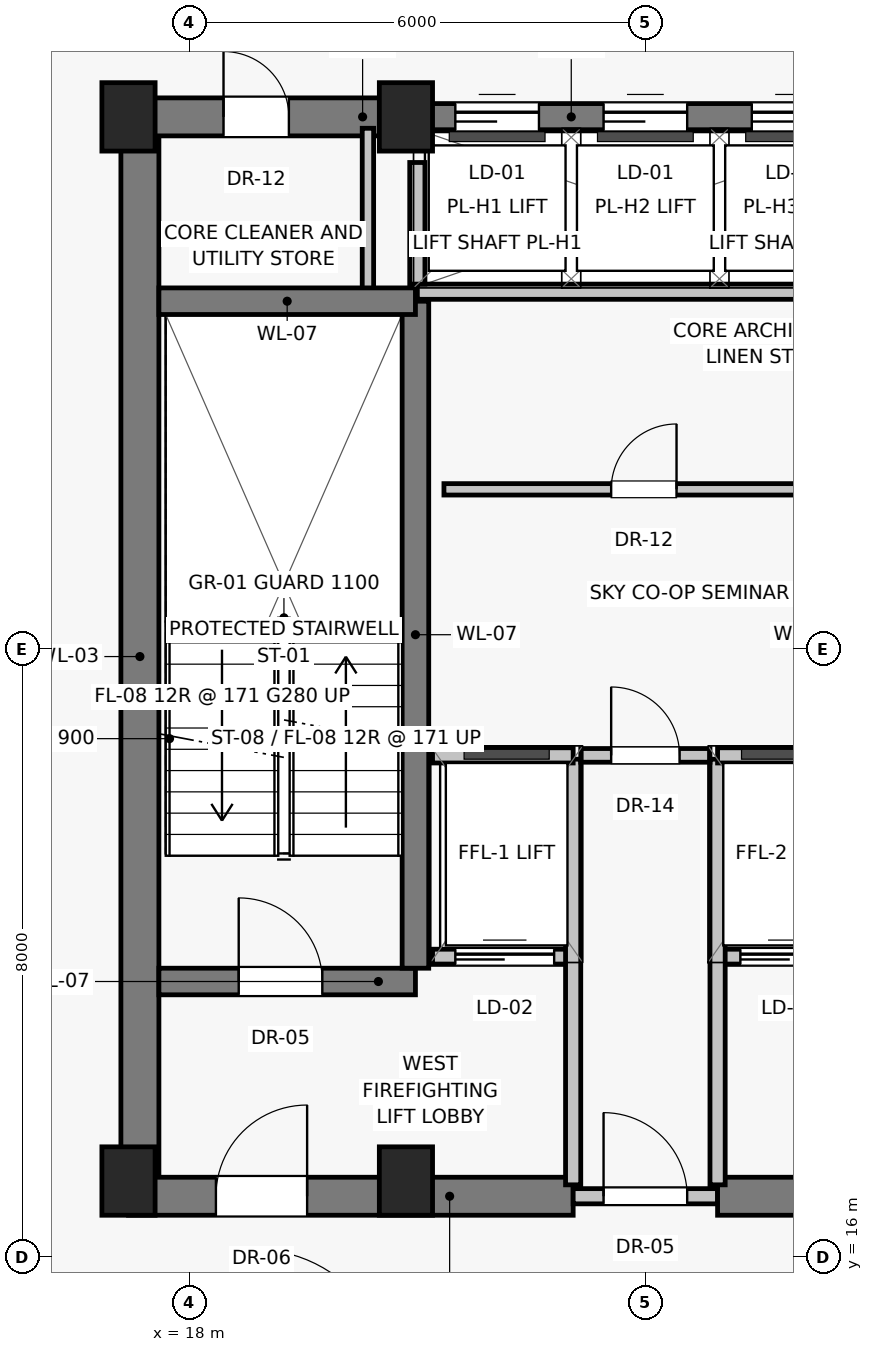
"""IFC4 building model, lengths in metres.
Left out: names, types, materials, properties, quantities, classifications, styles, units other than length and angle.
Written with IfcOpenShell. Run it as: python <this file> out.ifc"""

import sys

from ifc_helpers import new_model, si_unit, direction, frame, frame_2d, origin, origin_2d, place, context, subcontext, project, spatial, rectangle, extrude, source, transform, mapped, element, fill, save


model = new_model("IFC4")
c1 = context("Model", 3, precision=1e-05, world=origin(), true_north=direction((0.0, 1.0)))
c2 = subcontext(c1, "Body", "Model", "MODEL_VIEW")
j1 = project(units=[si_unit("LENGTHUNIT", "METRE"), si_unit("PLANEANGLEUNIT", "RADIAN")], contexts=[c1])
p1 = place(None, origin())
s1 = spatial("IfcSite", under=j1, at=p1, CompositionType="ELEMENT")
p2 = place(p1, origin())
s2 = spatial("IfcBuilding", under=s1, at=p2, CompositionType="ELEMENT")
p3 = place(p2, frame((0.0, 0.0, 236.55)))
s3 = spatial("IfcBuildingStorey", under=s2, at=p3, CompositionType="ELEMENT", Elevation=236.55)
for number, where, z_axis, x_axis in (
    (1, (17.2, 17.0, 0.0), (0.0, 0.0, 1.0), (1.0, 0.0, 0.0)),
    (2, (20.85, 17.0, 0.0), (0.0, 0.0, 1.0), (1.0, 0.0, 0.0)),
    (3, (17.2, 31.0, 0.0), (0.0, 0.0, 1.0), (1.0, 0.0, 0.0)),
    (4, (20.85, 31.0, 0.0), (0.0, 0.0, 1.0), (1.0, 0.0, 0.0)),
):
    element("IfcColumn", number, at=place(p3, frame(where, z_axis=z_axis, x_axis=x_axis)), inside=s3, PredefinedType="PILASTER", context=c2, shape_type="SweptSolid", body=[
        extrude(rectangle(XDim=0.7, YDim=0.9, at=origin_2d()), origin(), (0.0, 0.0, 1.0), 4.1),
    ])
p4 = place(p3, frame((17.35, 16.8, 0.0), z_axis=(0.0, 0.0, 1.0), x_axis=(0.0, 1.0, 0.0)))
e5 = element("IfcWall", 5, at=p4, inside=s3, PredefinedType="SHEAR", context=c2, shape_type="SweptSolid", body=[
    extrude(rectangle(XDim=14.2, YDim=0.5, at=frame_2d((7.1, 0.0))), origin(), (0.0, 0.0, 1.0), 3.865),
])
p5 = place(p3, frame((17.2, 16.8, 0.0), z_axis=(0.0, 0.0, 1.0), x_axis=(1.0, 0.0, 0.0)))
e6 = element("IfcWall", 6, at=p5, inside=s3, PredefinedType="SHEAR", context=c2, shape_type="SweptSolid", body=[
    extrude(rectangle(XDim=5.85, YDim=0.5, at=frame_2d((2.925, 0.0))), origin(), (0.0, 0.0, 1.0), 3.865),
])
p6 = place(p5, frame((1.15, 0.0, 0.0)))
e7 = element("IfcOpeningElement", 7, at=p6, cuts=e6, PredefinedType="OPENING", context=c2, shape_type="SweptSolid", body=[
    extrude(rectangle(XDim=1.2, YDim=2.03, at=frame_2d((0.6, 1.015))), frame((0.0, 0.26, 0.0), z_axis=(0.0, -1.0, 0.0), x_axis=(1.0, 0.0, 0.0)), (0.0, 0.0, 1.0), 0.52),
])
p7 = place(p3, frame((23.05, 16.8, 0.0), z_axis=(0.0, 0.0, 1.0), x_axis=(1.0, 0.0, 0.0)))
e8 = element("IfcWall", 8, at=p7, inside=s3, PredefinedType="SOLIDWALL", context=c2, shape_type="SweptSolid", body=[
    extrude(rectangle(XDim=1.9, YDim=0.2, at=frame_2d((0.95, 0.0))), origin(), (0.0, 0.0, 1.0), 3.015),
])
p8 = place(p7, frame((0.4, 0.0, 0.0)))
e9 = element("IfcOpeningElement", 9, at=p8, cuts=e8, PredefinedType="OPENING", context=c2, shape_type="SweptSolid", body=[
    extrude(rectangle(XDim=1.1, YDim=2.03, at=frame_2d((0.55, 1.015))), frame((0.0, 0.11, 0.0), z_axis=(0.0, -1.0, 0.0), x_axis=(1.0, 0.0, 0.0)), (0.0, 0.0, 1.0), 0.22),
])
p9 = place(p3, frame((24.95, 16.8, 0.0), z_axis=(0.0, 0.0, 1.0), x_axis=(1.0, 0.0, 0.0)))
e10 = element("IfcWall", 10, at=p9, inside=s3, PredefinedType="SHEAR", context=c2, shape_type="SweptSolid", body=[
    extrude(rectangle(XDim=5.85, YDim=0.5, at=frame_2d((2.925, 0.0))), origin(), (0.0, 0.0, 1.0), 3.865),
])
p10 = place(p9, frame((2.15, 0.0, 0.0)))
e11 = element("IfcOpeningElement", 11, at=p10, cuts=e10, PredefinedType="OPENING", context=c2, shape_type="SweptSolid", body=[
    extrude(rectangle(XDim=1.2, YDim=2.03, at=frame_2d((0.6, 1.015))), frame((0.0, 0.26, 0.0), z_axis=(0.0, -1.0, 0.0), x_axis=(1.0, 0.0, 0.0)), (0.0, 0.0, 1.0), 0.52),
])
p11 = place(p3, frame((17.2, 31.0, 0.0), z_axis=(0.0, 0.0, 1.0), x_axis=(1.0, 0.0, 0.0)))
e12 = element("IfcWall", 12, at=p11, inside=s3, PredefinedType="SHEAR", context=c2, shape_type="SweptSolid", body=[
    extrude(rectangle(XDim=3.8, YDim=0.5, at=frame_2d((1.9, 0.0))), origin(), (0.0, 0.0, 1.0), 3.865),
])
p12 = place(p11, frame((1.25, 0.0, 0.0)))
e13 = element("IfcOpeningElement", 13, at=p12, cuts=e12, PredefinedType="OPENING", context=c2, shape_type="SweptSolid", body=[
    extrude(rectangle(XDim=0.86, YDim=2.01, at=frame_2d((0.43, 1.005))), frame((0.0, 0.26, 0.0), z_axis=(0.0, -1.0, 0.0), x_axis=(1.0, 0.0, 0.0)), (0.0, 0.0, 1.0), 0.52),
])
p13 = place(p3, frame((21.0, 31.0, 0.0), z_axis=(0.0, 0.0, 1.0), x_axis=(1.0, 0.0, 0.0)))
e14 = element("IfcWall", 14, at=p13, inside=s3, PredefinedType="SHEAR", context=c2, shape_type="SweptSolid", body=[
    extrude(rectangle(XDim=6.0, YDim=0.35, at=frame_2d((3.0, 0.0))), origin(), (0.0, 0.0, 1.0), 3.865),
])
p14 = place(p13, frame((0.5, 0.0, 0.0)))
e15 = element("IfcOpeningElement", 15, at=p14, cuts=e14, PredefinedType="OPENING", context=c2, shape_type="SweptSolid", body=[
    extrude(rectangle(XDim=1.1, YDim=2.08, at=frame_2d((0.55, 1.04))), frame((0.0, 0.185, 0.0), z_axis=(0.0, -1.0, 0.0), x_axis=(1.0, 0.0, 0.0)), (0.0, 0.0, 1.0), 0.37),
])
p15 = place(p13, frame((2.45, 0.0, 0.0)))
e16 = element("IfcOpeningElement", 16, at=p15, cuts=e14, PredefinedType="OPENING", context=c2, shape_type="SweptSolid", body=[
    extrude(rectangle(XDim=1.1, YDim=2.08, at=frame_2d((0.55, 1.04))), frame((0.0, 0.185, 0.0), z_axis=(0.0, -1.0, 0.0), x_axis=(1.0, 0.0, 0.0)), (0.0, 0.0, 1.0), 0.37),
])
p16 = place(p13, frame((4.4, 0.0, 0.0)))
e17 = element("IfcOpeningElement", 17, at=p16, cuts=e14, PredefinedType="OPENING", context=c2, shape_type="SweptSolid", body=[
    extrude(rectangle(XDim=1.1, YDim=2.08, at=frame_2d((0.55, 1.04))), frame((0.0, 0.185, 0.0), z_axis=(0.0, -1.0, 0.0), x_axis=(1.0, 0.0, 0.0)), (0.0, 0.0, 1.0), 0.37),
])
p17 = place(p3, frame((20.35, 28.65, 0.0), z_axis=(0.0, 0.0, 1.0), x_axis=(0.0, 1.0, 0.0)))
e18 = element("IfcWall", 18, at=p17, inside=s3, PredefinedType="PARTITIONING", context=c2, shape_type="SweptSolid", body=[
    extrude(rectangle(XDim=2.2, YDim=0.15, at=frame_2d((1.1, 0.0))), origin(), (0.0, 0.0, 1.0), 3.865),
])
p18 = place(p3, frame((17.6, 19.625, 0.0), z_axis=(0.0, 0.0, 1.0), x_axis=(1.0, 0.0, 0.0)))
e19 = element("IfcWall", 19, at=p18, inside=s3, PredefinedType="SHEAR", context=c2, shape_type="SweptSolid", body=[
    extrude(rectangle(XDim=3.375, YDim=0.35, at=frame_2d((1.688, 0.0))), origin(), (0.0, 0.0, 1.0), 3.865),
])
p19 = place(p18, frame((1.05, 0.0, 0.0)))
e20 = element("IfcOpeningElement", 20, at=p19, cuts=e19, PredefinedType="OPENING", context=c2, shape_type="SweptSolid", body=[
    extrude(rectangle(XDim=1.1, YDim=2.03, at=frame_2d((0.55, 1.015))), frame((0.0, 0.185, 0.0), z_axis=(0.0, -1.0, 0.0), x_axis=(1.0, 0.0, 0.0)), (0.0, 0.0, 1.0), 0.37),
])
p20 = place(p3, frame((21.2, 19.95, 0.0), z_axis=(0.0, 0.0, 1.0), x_axis=(1.0, 0.0, 0.0)))
e21 = element("IfcWall", 21, at=p20, inside=s3, PredefinedType="SOLIDWALL", context=c2, shape_type="SweptSolid", body=[
    extrude(rectangle(XDim=1.85, YDim=0.2, at=frame_2d((0.925, 0.0))), origin(), (0.0, 0.0, 1.0), 3.865),
])
p21 = place(p20, frame((0.3, 0.0, 0.0)))
e22 = element("IfcOpeningElement", 22, at=p21, cuts=e21, PredefinedType="OPENING", context=c2, shape_type="SweptSolid", body=[
    extrude(rectangle(XDim=1.3, YDim=2.25, at=frame_2d((0.65, 1.125))), frame((0.0, 0.11, 0.0), z_axis=(0.0, -1.0, 0.0), x_axis=(1.0, 0.0, 0.0)), (0.0, 0.0, 1.0), 0.22),
])
p22 = place(p3, frame((24.95, 19.95, 0.0), z_axis=(0.0, 0.0, 1.0), x_axis=(1.0, 0.0, 0.0)))
e23 = element("IfcWall", 23, at=p22, inside=s3, PredefinedType="SOLIDWALL", context=c2, shape_type="SweptSolid", body=[
    extrude(rectangle(XDim=1.85, YDim=0.2, at=frame_2d((0.925, 0.0))), origin(), (0.0, 0.0, 1.0), 3.865),
])
p23 = place(p22, frame((0.3, 0.0, 0.0)))
e24 = element("IfcOpeningElement", 24, at=p23, cuts=e23, PredefinedType="OPENING", context=c2, shape_type="SweptSolid", body=[
    extrude(rectangle(XDim=1.3, YDim=2.25, at=frame_2d((0.65, 1.125))), frame((0.0, 0.11, 0.0), z_axis=(0.0, -1.0, 0.0), x_axis=(1.0, 0.0, 0.0)), (0.0, 0.0, 1.0), 0.22),
])
p24 = place(p3, frame((20.975, 19.8, 0.0), z_axis=(0.0, 0.0, 1.0), x_axis=(0.0, 1.0, 0.0)))
e25 = element("IfcWall", 25, at=p24, inside=s3, PredefinedType="SHEAR", context=c2, shape_type="SweptSolid", body=[
    extrude(rectangle(XDim=8.775, YDim=0.35, at=frame_2d((4.387, 0.0))), origin(), (0.0, 0.0, 1.0), 3.865),
])
p25 = place(p3, frame((17.6, 28.575, 0.0), z_axis=(0.0, 0.0, 1.0), x_axis=(1.0, 0.0, 0.0)))
e26 = element("IfcWall", 26, at=p25, inside=s3, PredefinedType="SHEAR", context=c2, shape_type="SweptSolid", body=[
    extrude(rectangle(XDim=3.375, YDim=0.35, at=frame_2d((1.688, 0.0))), origin(), (0.0, 0.0, 1.0), 3.865),
])
for number, where, z_axis, x_axis in (
    (27, (23.05, 16.95, 0.0), (0.0, 0.0, 1.0), (0.0, 1.0, 0.0)),
    (28, (24.95, 16.95, 0.0), (0.0, 0.0, 1.0), (0.0, 1.0, 0.0)),
):
    element("IfcWall", number, at=place(p3, frame(where, z_axis=z_axis, x_axis=x_axis)), inside=s3, PredefinedType="SOLIDWALL", context=c2, shape_type="SweptSolid", body=[
        extrude(rectangle(XDim=5.6, YDim=0.2, at=frame_2d((2.8, 0.0))), origin(), (0.0, 0.0, 1.0), 3.865),
    ])
for number, where, z_axis, x_axis in (
    (29, (21.2, 22.6, 0.0), (0.0, 0.0, 1.0), (1.0, 0.0, 0.0)),
    (30, (24.95, 22.6, 0.0), (0.0, 0.0, 1.0), (1.0, 0.0, 0.0)),
):
    element("IfcWall", number, at=place(p3, frame(where, z_axis=z_axis, x_axis=x_axis)), inside=s3, PredefinedType="SOLIDWALL", context=c2, shape_type="SweptSolid", body=[
        extrude(rectangle(XDim=1.85, YDim=0.2, at=frame_2d((0.925, 0.0))), origin(), (0.0, 0.0, 1.0), 3.865),
    ])
p26 = place(p3, frame((21.0, 28.7, 0.0), z_axis=(0.0, 0.0, 1.0), x_axis=(1.0, 0.0, 0.0)))
e31 = element("IfcWall", 31, at=p26, inside=s3, PredefinedType="SOLIDWALL", context=c2, shape_type="SweptSolid", body=[
    extrude(rectangle(XDim=6.0, YDim=0.2, at=frame_2d((3.0, 0.0))), origin(), (0.0, 0.0, 1.0), 3.865),
])
p27 = place(p3, frame((21.0, 28.8, 0.0), z_axis=(0.0, 0.0, 1.0), x_axis=(0.0, 1.0, 0.0)))
e32 = element("IfcWall", 32, at=p27, inside=s3, PredefinedType="SOLIDWALL", context=c2, shape_type="SweptSolid", body=[
    extrude(rectangle(XDim=1.6, YDim=0.2, at=frame_2d((0.8, 0.0))), origin(), (0.0, 0.0, 1.0), 3.865),
])
p28 = place(p3, frame((23.15, 22.6, 0.0), z_axis=(0.0, 0.0, 1.0), x_axis=(1.0, 0.0, 0.0)))
e33 = element("IfcWall", 33, at=p28, inside=s3, PredefinedType="PARTITIONING", context=c2, shape_type="SweptSolid", body=[
    extrude(rectangle(XDim=1.7, YDim=0.18, at=frame_2d((0.85, 0.0))), origin(), (0.0, 0.0, 1.0), 3.865),
])
p29 = place(p28, frame((0.4, 0.0, 0.0)))
e34 = element("IfcOpeningElement", 34, at=p29, cuts=e33, PredefinedType="OPENING", context=c2, shape_type="SweptSolid", body=[
    extrude(rectangle(XDim=0.9, YDim=2.01, at=frame_2d((0.45, 1.005))), frame((0.0, 0.1, 0.0), z_axis=(0.0, -1.0, 0.0), x_axis=(1.0, 0.0, 0.0)), (0.0, 0.0, 1.0), 0.2),
])
p30 = place(p3, frame((21.35, 26.1, 0.0), z_axis=(0.0, 0.0, 1.0), x_axis=(1.0, 0.0, 0.0)))
e35 = element("IfcWall", 35, at=p30, inside=s3, PredefinedType="PARTITIONING", context=c2, shape_type="SweptSolid", body=[
    extrude(rectangle(XDim=5.3, YDim=0.15, at=frame_2d((2.65, 0.0))), origin(), (0.0, 0.0, 1.0), 3.865),
])
p31 = place(p30, frame((2.2, 0.0, 0.0)))
e36 = element("IfcOpeningElement", 36, at=p31, cuts=e35, PredefinedType="OPENING", context=c2, shape_type="SweptSolid", body=[
    extrude(rectangle(XDim=0.86, YDim=2.01, at=frame_2d((0.43, 1.005))), frame((0.0, 0.085, 0.0), z_axis=(0.0, -1.0, 0.0), x_axis=(1.0, 0.0, 0.0)), (0.0, 0.0, 1.0), 0.17),
])
m1 = source(origin(), c2, "Body", "SweptSolid", [
    extrude(rectangle(XDim=1.2, YDim=2.03, at=frame_2d((0.6, 1.015))), frame((0.0, 0.025, 0.0), z_axis=(0.0, -1.0, 0.0), x_axis=(1.0, 0.0, 0.0)), (0.0, 0.0, 1.0), 0.05),
])
p32 = place(p6, origin())
e37 = element("IfcDoor", 37, at=p32, inside=s3, OperationType="SINGLE_SWING_RIGHT", PredefinedType="DOOR", context=c2, shape_type="MappedRepresentation", body=[
    mapped(m1, transform((0.0, 0.0, 0.0), scale=1.0)),
])
fill(e7, e37)
m2 = source(origin(), c2, "Body", "SweptSolid", [
    extrude(rectangle(XDim=1.1, YDim=2.03, at=frame_2d((0.55, 1.015))), frame((0.0, 0.025, 0.0), z_axis=(0.0, -1.0, 0.0), x_axis=(1.0, 0.0, 0.0)), (0.0, 0.0, 1.0), 0.05),
])
p33 = place(p8, origin())
e38 = element("IfcDoor", 38, at=p33, inside=s3, OperationType="SINGLE_SWING_LEFT", PredefinedType="DOOR", context=c2, shape_type="MappedRepresentation", body=[
    mapped(m2, transform((0.0, 0.0, 0.0), scale=1.0)),
])
fill(e9, e38)
m3 = source(origin(), c2, "Body", "SweptSolid", [
    extrude(rectangle(XDim=0.86, YDim=2.01, at=frame_2d((0.43, 1.005))), frame((0.0, 0.025, 0.0), z_axis=(0.0, -1.0, 0.0), x_axis=(1.0, 0.0, 0.0)), (0.0, 0.0, 1.0), 0.05),
])
p34 = place(p12, origin())
e39 = element("IfcDoor", 39, at=p34, inside=s3, OperationType="SINGLE_SWING_LEFT", PredefinedType="DOOR", context=c2, shape_type="MappedRepresentation", body=[
    mapped(m3, transform((0.0, 0.0, 0.0), scale=1.0)),
])
fill(e13, e39)
m4 = source(origin(), c2, "Body", "SweptSolid", [
    extrude(rectangle(XDim=1.1, YDim=2.08, at=frame_2d((0.55, 1.04))), frame((0.0, 0.025, 0.0), z_axis=(0.0, -1.0, 0.0), x_axis=(1.0, 0.0, 0.0)), (0.0, 0.0, 1.0), 0.05),
])
p35 = place(p14, origin())
e40 = element("IfcDoor", 40, at=p35, inside=s3, OperationType="SLIDING_TO_LEFT", PredefinedType="DOOR", context=c2, shape_type="MappedRepresentation", body=[
    mapped(m4, transform((0.0, 0.0, 0.0), scale=1.0)),
])
fill(e15, e40)
p36 = place(p15, origin())
e41 = element("IfcDoor", 41, at=p36, inside=s3, OperationType="SLIDING_TO_LEFT", PredefinedType="DOOR", context=c2, shape_type="MappedRepresentation", body=[
    mapped(m4, transform((0.0, 0.0, 0.0), scale=1.0)),
])
fill(e16, e41)
p37 = place(p16, origin())
e42 = element("IfcDoor", 42, at=p37, inside=s3, OperationType="SLIDING_TO_LEFT", PredefinedType="DOOR", context=c2, shape_type="MappedRepresentation", body=[
    mapped(m4, transform((0.0, 0.0, 0.0), scale=1.0)),
])
fill(e17, e42)
p38 = place(p19, origin())
e43 = element("IfcDoor", 43, at=p38, inside=s3, OperationType="SINGLE_SWING_LEFT", PredefinedType="DOOR", context=c2, shape_type="MappedRepresentation", body=[
    mapped(m2, transform((0.0, 0.0, 0.0), scale=1.0)),
])
fill(e20, e43)
m5 = source(origin(), c2, "Body", "SweptSolid", [
    extrude(rectangle(XDim=1.3, YDim=2.25, at=frame_2d((0.65, 1.125))), frame((0.0, 0.025, 0.0), z_axis=(0.0, -1.0, 0.0), x_axis=(1.0, 0.0, 0.0)), (0.0, 0.0, 1.0), 0.05),
])
p39 = place(p21, origin())
e44 = element("IfcDoor", 44, at=p39, inside=s3, OperationType="SLIDING_TO_LEFT", PredefinedType="DOOR", context=c2, shape_type="MappedRepresentation", body=[
    mapped(m5, transform((0.0, 0.0, 0.0), scale=1.0)),
])
fill(e22, e44)
p40 = place(p23, origin())
e45 = element("IfcDoor", 45, at=p40, inside=s3, OperationType="SLIDING_TO_LEFT", PredefinedType="DOOR", context=c2, shape_type="MappedRepresentation", body=[
    mapped(m5, transform((0.0, 0.0, 0.0), scale=1.0)),
])
fill(e24, e45)
m6 = source(origin(), c2, "Body", "SweptSolid", [
    extrude(rectangle(XDim=0.9, YDim=2.01, at=frame_2d((0.45, 1.005))), frame((0.0, 0.025, 0.0), z_axis=(0.0, -1.0, 0.0), x_axis=(1.0, 0.0, 0.0)), (0.0, 0.0, 1.0), 0.05),
])
p41 = place(p29, origin())
e46 = element("IfcDoor", 46, at=p41, inside=s3, OperationType="SINGLE_SWING_LEFT", PredefinedType="DOOR", context=c2, shape_type="MappedRepresentation", body=[
    mapped(m6, transform((0.0, 0.0, 0.0), scale=1.0)),
])
fill(e34, e46)
p42 = place(p31, origin())
e47 = element("IfcDoor", 47, at=p42, inside=s3, OperationType="SINGLE_SWING_RIGHT", PredefinedType="DOOR", context=c2, shape_type="MappedRepresentation", body=[
    mapped(m3, transform((0.0, 0.0, 0.0), scale=1.0)),
])
fill(e36, e47)
save(model, sys.argv[1])
